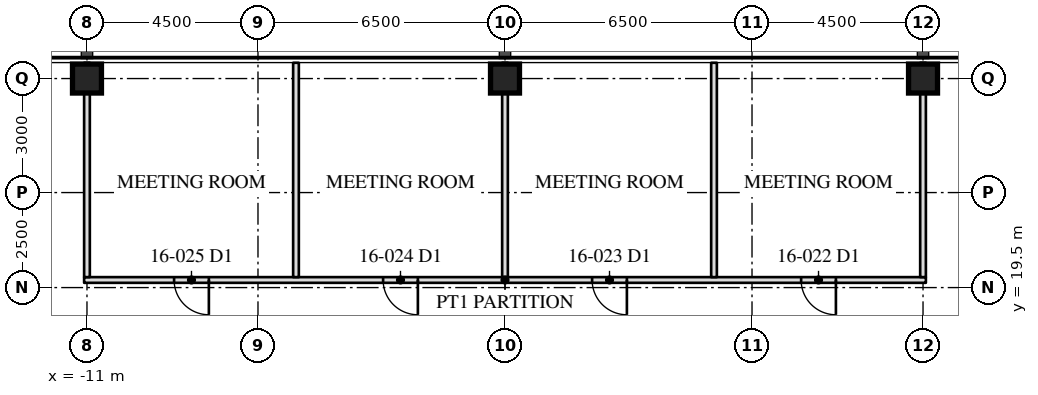
"""IFC4 building model, lengths in metres.
Left out: names, types, materials, properties, quantities, classifications, styles, units other than length and angle.
Written with IfcOpenShell. Run it as: python <this file> out.ifc"""

import sys

from ifc_helpers import new_model, si_unit, direction, frame, frame_2d, origin, origin_2d, place, context, subcontext, project, spatial, rectangle, hollow_rectangle, extrude, element, fill, save


model = new_model("IFC4")
c1 = context("Model", 3, precision=1e-05, world=origin(), true_north=direction((0.0, 1.0)))
c2 = subcontext(c1, "Body", "Model", "MODEL_VIEW")
j1 = project(units=[si_unit("LENGTHUNIT", "METRE"), si_unit("PLANEANGLEUNIT", "RADIAN")], contexts=[c1])
p1 = place(None, origin())
s1 = spatial("IfcSite", under=j1, at=p1, CompositionType="ELEMENT")
p2 = place(p1, origin())
s2 = spatial("IfcBuilding", under=s1, at=p2, CompositionType="ELEMENT")
p3 = place(p2, frame((0.0, 0.0, 69.3)))
s3 = spatial("IfcBuildingStorey", under=s2, at=p3, CompositionType="ELEMENT", Elevation=69.3)
for number, where, z_axis, x_axis in (
    (1, (11.0, 25.0, 0.0), (0.0, 0.0, 1.0), (1.0, 0.0, 0.0)),
    (2, (0.0, 25.0, 0.0), (0.0, 0.0, 1.0), (1.0, 0.0, 0.0)),
    (3, (-11.0, 25.0, 0.0), (0.0, 0.0, 1.0), (1.0, 0.0, 0.0)),
):
    element("IfcColumn", number, at=place(p3, frame(where, z_axis=z_axis, x_axis=x_axis)), inside=s3, PredefinedType="COLUMN", context=c2, shape_type="SweptSolid", body=[
        extrude(hollow_rectangle(XDim=0.762, YDim=0.762, WallThickness=0.127, at=origin_2d()), origin(), (0.0, 0.0, 1.0), 4.1),
    ])
p4 = place(p3, frame((11.075, 19.7, 0.0), z_axis=(0.0, 0.0, 1.0), x_axis=(-1.0, 0.0, 0.0)))
e4 = element("IfcWall", 4, at=p4, inside=s3, PredefinedType="PARTITIONING", context=c2, shape_type="SweptSolid", body=[
    extrude(rectangle(XDim=22.15, YDim=0.15, at=frame_2d((11.075, 0.0))), origin(), (0.0, 0.0, 1.0), 3.91),
])
p5 = place(p4, frame((2.367, 0.0, 0.0)))
e5 = element("IfcOpeningElement", 5, at=p5, cuts=e4, PredefinedType="OPENING", context=c2, shape_type="SweptSolid", body=[
    extrude(rectangle(XDim=0.915, YDim=2.134, at=frame_2d((0.458, 1.067))), frame((0.0, 0.085, 0.0), z_axis=(0.0, -1.0, 0.0), x_axis=(1.0, 0.0, 0.0)), (0.0, 0.0, 1.0), 0.17),
])
p6 = place(p4, frame((7.867, 0.0, 0.0)))
e6 = element("IfcOpeningElement", 6, at=p6, cuts=e4, PredefinedType="OPENING", context=c2, shape_type="SweptSolid", body=[
    extrude(rectangle(XDim=0.915, YDim=2.134, at=frame_2d((0.458, 1.067))), frame((0.0, 0.085, 0.0), z_axis=(0.0, -1.0, 0.0), x_axis=(1.0, 0.0, 0.0)), (0.0, 0.0, 1.0), 0.17),
])
p7 = place(p4, frame((13.367, 0.0, 0.0)))
e7 = element("IfcOpeningElement", 7, at=p7, cuts=e4, PredefinedType="OPENING", context=c2, shape_type="SweptSolid", body=[
    extrude(rectangle(XDim=0.915, YDim=2.134, at=frame_2d((0.458, 1.067))), frame((0.0, 0.085, 0.0), z_axis=(0.0, -1.0, 0.0), x_axis=(1.0, 0.0, 0.0)), (0.0, 0.0, 1.0), 0.17),
])
p8 = place(p4, frame((18.867, 0.0, 0.0)))
e8 = element("IfcOpeningElement", 8, at=p8, cuts=e4, PredefinedType="OPENING", context=c2, shape_type="SweptSolid", body=[
    extrude(rectangle(XDim=0.915, YDim=2.134, at=frame_2d((0.458, 1.067))), frame((0.0, 0.085, 0.0), z_axis=(0.0, -1.0, 0.0), x_axis=(1.0, 0.0, 0.0)), (0.0, 0.0, 1.0), 0.17),
])
p9 = place(p3, frame((11.0, 19.775, 0.0), z_axis=(0.0, 0.0, 1.0), x_axis=(0.0, 1.0, 0.0)))
e9 = element("IfcWall", 9, at=p9, inside=s3, PredefinedType="PARTITIONING", context=c2, shape_type="SweptSolid", body=[
    extrude(rectangle(XDim=5.64, YDim=0.15, at=frame_2d((2.82, 0.0))), origin(), (0.0, 0.0, 1.0), 3.13),
])
p10 = place(p3, frame((5.5, 19.775, 0.0), z_axis=(0.0, 0.0, 1.0), x_axis=(0.0, 1.0, 0.0)))
e10 = element("IfcWall", 10, at=p10, inside=s3, PredefinedType="PARTITIONING", context=c2, shape_type="SweptSolid", body=[
    extrude(rectangle(XDim=5.64, YDim=0.15, at=frame_2d((2.82, 0.0))), origin(), (0.0, 0.0, 1.0), 3.91),
])
p11 = place(p3, frame((0.0, 19.775, 0.0), z_axis=(0.0, 0.0, 1.0), x_axis=(0.0, 1.0, 0.0)))
e11 = element("IfcWall", 11, at=p11, inside=s3, PredefinedType="PARTITIONING", context=c2, shape_type="SweptSolid", body=[
    extrude(rectangle(XDim=5.64, YDim=0.15, at=frame_2d((2.82, 0.0))), origin(), (0.0, 0.0, 1.0), 3.13),
])
p12 = place(p3, frame((-5.5, 19.775, 0.0), z_axis=(0.0, 0.0, 1.0), x_axis=(0.0, 1.0, 0.0)))
e12 = element("IfcWall", 12, at=p12, inside=s3, PredefinedType="PARTITIONING", context=c2, shape_type="SweptSolid", body=[
    extrude(rectangle(XDim=5.64, YDim=0.15, at=frame_2d((2.82, 0.0))), origin(), (0.0, 0.0, 1.0), 3.91),
])
p13 = place(p3, frame((-11.0, 19.775, 0.0), z_axis=(0.0, 0.0, 1.0), x_axis=(0.0, 1.0, 0.0)))
e13 = element("IfcWall", 13, at=p13, inside=s3, PredefinedType="PARTITIONING", context=c2, shape_type="SweptSolid", body=[
    extrude(rectangle(XDim=5.64, YDim=0.15, at=frame_2d((2.82, 0.0))), origin(), (0.0, 0.0, 1.0), 3.13),
])
p14 = place(p5, origin())
e14 = element("IfcDoor", 14, at=p14, inside=s3, OperationType="SINGLE_SWING_LEFT", PredefinedType="DOOR", context=c2, shape_type="SweptSolid", body=[
    extrude(rectangle(XDim=0.915, YDim=2.134, at=frame_2d((0.458, 1.067))), frame((0.0, 0.025, 0.0), z_axis=(0.0, -1.0, 0.0), x_axis=(1.0, 0.0, 0.0)), (0.0, 0.0, 1.0), 0.05),
])
fill(e5, e14)
p15 = place(p6, origin())
e15 = element("IfcDoor", 15, at=p15, inside=s3, OperationType="SINGLE_SWING_LEFT", PredefinedType="DOOR", context=c2, shape_type="SweptSolid", body=[
    extrude(rectangle(XDim=0.915, YDim=2.134, at=frame_2d((0.458, 1.067))), frame((0.0, 0.025, 0.0), z_axis=(0.0, -1.0, 0.0), x_axis=(1.0, 0.0, 0.0)), (0.0, 0.0, 1.0), 0.05),
])
fill(e6, e15)
p16 = place(p7, origin())
e16 = element("IfcDoor", 16, at=p16, inside=s3, OperationType="SINGLE_SWING_LEFT", PredefinedType="DOOR", context=c2, shape_type="SweptSolid", body=[
    extrude(rectangle(XDim=0.915, YDim=2.134, at=frame_2d((0.458, 1.067))), frame((0.0, 0.025, 0.0), z_axis=(0.0, -1.0, 0.0), x_axis=(1.0, 0.0, 0.0)), (0.0, 0.0, 1.0), 0.05),
])
fill(e7, e16)
p17 = place(p8, origin())
e17 = element("IfcDoor", 17, at=p17, inside=s3, OperationType="SINGLE_SWING_LEFT", PredefinedType="DOOR", context=c2, shape_type="SweptSolid", body=[
    extrude(rectangle(XDim=0.915, YDim=2.134, at=frame_2d((0.458, 1.067))), frame((0.0, 0.025, 0.0), z_axis=(0.0, -1.0, 0.0), x_axis=(1.0, 0.0, 0.0)), (0.0, 0.0, 1.0), 0.05),
])
fill(e8, e17)
save(model, sys.argv[1])
